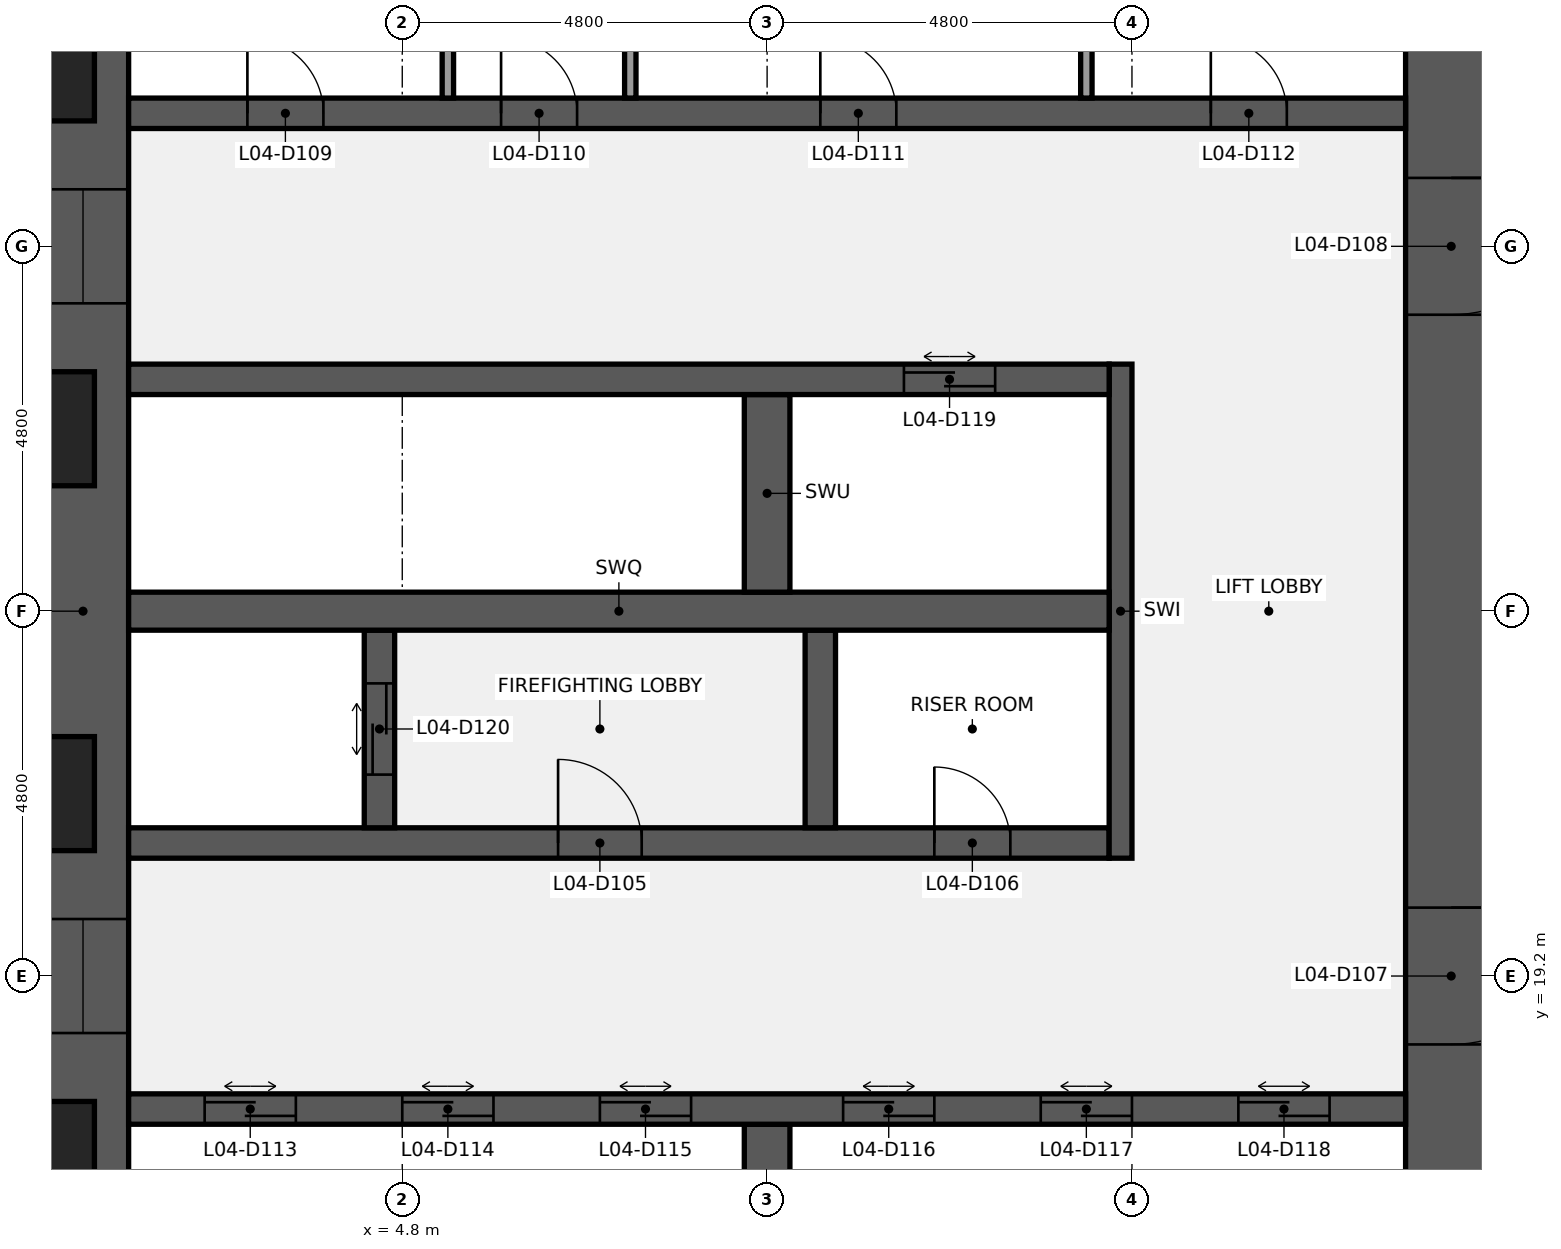
"""IFC4 building model, lengths in metres.
Left out: names, types, materials, properties, quantities, classifications, styles, units other than length and angle.
Written with IfcOpenShell. Run it as: python <this file> out.ifc"""

import sys

from ifc_helpers import new_model, si_unit, direction, frame, frame_2d, origin, place, context, subcontext, project, spatial, rectangle, extrude, element, fill, save


model = new_model("IFC4")
c1 = context("Model", 3, precision=1e-05, world=origin(), true_north=direction((0.0, 1.0)))
c2 = subcontext(c1, "Body", "Model", "MODEL_VIEW")
j1 = project(units=[si_unit("LENGTHUNIT", "METRE"), si_unit("PLANEANGLEUNIT", "RADIAN")], contexts=[c1])
p1 = place(None, origin())
s1 = spatial("IfcSite", under=j1, at=p1, CompositionType="ELEMENT")
p2 = place(p1, origin())
s2 = spatial("IfcBuilding", under=s1, at=p2, CompositionType="ELEMENT")
p3 = place(p2, frame((0.0, 0.0, 25.8)))
s3 = spatial("IfcBuildingStorey", under=s2, at=p3, CompositionType="ELEMENT", Elevation=25.8)
p4 = place(p3, frame((0.6, 9.6, 0.0), z_axis=(0.0, 0.0, 1.0), x_axis=(0.0, 1.0, 0.0)))
e1 = element("IfcWall", 1, at=p4, inside=s3, PredefinedType="SHEAR", context=c2, shape_type="SweptSolid", body=[
    extrude(rectangle(XDim=28.8, YDim=1.2, at=frame_2d((14.4, 0.0))), origin(), (0.0, 0.0, 1.0), 4.24),
])
p5 = place(p4, frame((8.85, 0.0, 0.9)))
e2 = element("IfcOpeningElement", 2, at=p5, cuts=e1, PredefinedType="OPENING", context=c2, shape_type="SweptSolid", body=[
    extrude(rectangle(XDim=1.5, YDim=1.5, at=frame_2d((0.75, 0.75))), frame((0.0, 0.61, 0.0), z_axis=(0.0, -1.0, 0.0), x_axis=(1.0, 0.0, 0.0)), (0.0, 0.0, 1.0), 1.22),
])
p6 = place(p4, frame((18.45, 0.0, 0.9)))
e3 = element("IfcOpeningElement", 3, at=p6, cuts=e1, PredefinedType="OPENING", context=c2, shape_type="SweptSolid", body=[
    extrude(rectangle(XDim=1.5, YDim=1.5, at=frame_2d((0.75, 0.75))), frame((0.0, 0.61, 0.0), z_axis=(0.0, -1.0, 0.0), x_axis=(1.0, 0.0, 0.0)), (0.0, 0.0, 1.0), 1.22),
])
p7 = place(p3, frame((18.6, 38.4, 0.0), z_axis=(0.0, 0.0, 1.0), x_axis=(0.0, -1.0, 0.0)))
e4 = element("IfcWall", 4, at=p7, inside=s3, PredefinedType="SHEAR", context=c2, shape_type="SweptSolid", body=[
    extrude(rectangle(XDim=28.8, YDim=1.2, at=frame_2d((14.4, 0.0))), origin(), (0.0, 0.0, 1.0), 4.24),
])
p8 = place(p7, frame((18.3, 0.0, 0.0)))
e5 = element("IfcOpeningElement", 5, at=p8, cuts=e4, PredefinedType="OPENING", context=c2, shape_type="SweptSolid", body=[
    extrude(rectangle(XDim=1.8, YDim=2.1, at=frame_2d((0.9, 1.05))), frame((0.0, 0.61, 0.0), z_axis=(0.0, -1.0, 0.0), x_axis=(1.0, 0.0, 0.0)), (0.0, 0.0, 1.0), 1.22),
])
p9 = place(p7, frame((8.7, 0.0, 0.0)))
e6 = element("IfcOpeningElement", 6, at=p9, cuts=e4, PredefinedType="OPENING", context=c2, shape_type="SweptSolid", body=[
    extrude(rectangle(XDim=1.8, YDim=2.1, at=frame_2d((0.9, 1.05))), frame((0.0, 0.61, 0.0), z_axis=(0.0, -1.0, 0.0), x_axis=(1.0, 0.0, 0.0)), (0.0, 0.0, 1.0), 1.22),
])
p10 = place(p3, frame((9.6, 14.65, 0.0), z_axis=(0.0, 0.0, 1.0), x_axis=(0.0, 1.0, 0.0)))
e7 = element("IfcWall", 7, at=p10, inside=s3, PredefinedType="SHEAR", context=c2, shape_type="SweptSolid", body=[
    extrude(rectangle(XDim=2.6, YDim=0.6, at=frame_2d((1.3, 0.0))), origin(), (0.0, 0.0, 1.0), 4.24),
])
p11 = place(p3, frame((1.2, 17.45, 0.0), z_axis=(0.0, 0.0, 1.0), x_axis=(1.0, 0.0, 0.0)))
e8 = element("IfcWall", 8, at=p11, inside=s3, PredefinedType="SHEAR", context=c2, shape_type="SweptSolid", body=[
    extrude(rectangle(XDim=16.8, YDim=0.4, at=frame_2d((8.4, 0.0))), origin(), (0.0, 0.0, 1.0), 4.24),
])
p12 = place(p11, frame((1.0, 0.0, 0.0)))
e9 = element("IfcOpeningElement", 9, at=p12, cuts=e8, PredefinedType="OPENING", context=c2, shape_type="SweptSolid", body=[
    extrude(rectangle(XDim=1.2, YDim=2.1, at=frame_2d((0.6, 1.05))), frame((0.0, 0.21, 0.0), z_axis=(0.0, -1.0, 0.0), x_axis=(1.0, 0.0, 0.0)), (0.0, 0.0, 1.0), 0.42),
])
p13 = place(p11, frame((3.6, 0.0, 0.0)))
e10 = element("IfcOpeningElement", 10, at=p13, cuts=e8, PredefinedType="OPENING", context=c2, shape_type="SweptSolid", body=[
    extrude(rectangle(XDim=1.2, YDim=2.1, at=frame_2d((0.6, 1.05))), frame((0.0, 0.21, 0.0), z_axis=(0.0, -1.0, 0.0), x_axis=(1.0, 0.0, 0.0)), (0.0, 0.0, 1.0), 0.42),
])
p14 = place(p11, frame((6.2, 0.0, 0.0)))
e11 = element("IfcOpeningElement", 11, at=p14, cuts=e8, PredefinedType="OPENING", context=c2, shape_type="SweptSolid", body=[
    extrude(rectangle(XDim=1.2, YDim=2.1, at=frame_2d((0.6, 1.05))), frame((0.0, 0.21, 0.0), z_axis=(0.0, -1.0, 0.0), x_axis=(1.0, 0.0, 0.0)), (0.0, 0.0, 1.0), 0.42),
])
p15 = place(p11, frame((9.4, 0.0, 0.0)))
e12 = element("IfcOpeningElement", 12, at=p15, cuts=e8, PredefinedType="OPENING", context=c2, shape_type="SweptSolid", body=[
    extrude(rectangle(XDim=1.2, YDim=2.1, at=frame_2d((0.6, 1.05))), frame((0.0, 0.21, 0.0), z_axis=(0.0, -1.0, 0.0), x_axis=(1.0, 0.0, 0.0)), (0.0, 0.0, 1.0), 0.42),
])
p16 = place(p11, frame((12.0, 0.0, 0.0)))
e13 = element("IfcOpeningElement", 13, at=p16, cuts=e8, PredefinedType="OPENING", context=c2, shape_type="SweptSolid", body=[
    extrude(rectangle(XDim=1.2, YDim=2.1, at=frame_2d((0.6, 1.05))), frame((0.0, 0.21, 0.0), z_axis=(0.0, -1.0, 0.0), x_axis=(1.0, 0.0, 0.0)), (0.0, 0.0, 1.0), 0.42),
])
p17 = place(p11, frame((14.6, 0.0, 0.0)))
e14 = element("IfcOpeningElement", 14, at=p17, cuts=e8, PredefinedType="OPENING", context=c2, shape_type="SweptSolid", body=[
    extrude(rectangle(XDim=1.2, YDim=2.1, at=frame_2d((0.6, 1.05))), frame((0.0, 0.21, 0.0), z_axis=(0.0, -1.0, 0.0), x_axis=(1.0, 0.0, 0.0)), (0.0, 0.0, 1.0), 0.42),
])
p18 = place(p3, frame((1.2, 20.95, 0.0), z_axis=(0.0, 0.0, 1.0), x_axis=(1.0, 0.0, 0.0)))
e15 = element("IfcWall", 15, at=p18, inside=s3, PredefinedType="SHEAR", context=c2, shape_type="SweptSolid", body=[
    extrude(rectangle(XDim=12.9, YDim=0.4, at=frame_2d((6.45, 0.0))), origin(), (0.0, 0.0, 1.0), 4.24),
])
p19 = place(p18, frame((5.65, 0.0, 0.0)))
e16 = element("IfcOpeningElement", 16, at=p19, cuts=e15, PredefinedType="OPENING", context=c2, shape_type="SweptSolid", body=[
    extrude(rectangle(XDim=1.1, YDim=2.1, at=frame_2d((0.55, 1.05))), frame((0.0, 0.21, 0.0), z_axis=(0.0, -1.0, 0.0), x_axis=(1.0, 0.0, 0.0)), (0.0, 0.0, 1.0), 0.42),
])
p20 = place(p18, frame((10.6, 0.0, 0.0)))
e17 = element("IfcOpeningElement", 17, at=p20, cuts=e15, PredefinedType="OPENING", context=c2, shape_type="SweptSolid", body=[
    extrude(rectangle(XDim=1.0, YDim=2.1, at=frame_2d((0.5, 1.05))), frame((0.0, 0.21, 0.0), z_axis=(0.0, -1.0, 0.0), x_axis=(1.0, 0.0, 0.0)), (0.0, 0.0, 1.0), 0.42),
])
p21 = place(p3, frame((14.25, 20.75, 0.0), z_axis=(0.0, 0.0, 1.0), x_axis=(0.0, 1.0, 0.0)))
e18 = element("IfcWall", 18, at=p21, inside=s3, PredefinedType="SHEAR", context=c2, shape_type="SweptSolid", body=[
    extrude(rectangle(XDim=6.5, YDim=0.3, at=frame_2d((3.25, 0.0))), origin(), (0.0, 0.0, 1.0), 4.24),
])
p22 = place(p3, frame((4.5, 21.15, 0.0), z_axis=(0.0, 0.0, 1.0), x_axis=(0.0, 1.0, 0.0)))
e19 = element("IfcWall", 19, at=p22, inside=s3, PredefinedType="SHEAR", context=c2, shape_type="SweptSolid", body=[
    extrude(rectangle(XDim=2.6, YDim=0.4, at=frame_2d((1.3, 0.0))), origin(), (0.0, 0.0, 1.0), 4.24),
])
p23 = place(p22, frame((0.7, 0.0, 0.0)))
e20 = element("IfcOpeningElement", 20, at=p23, cuts=e19, PredefinedType="OPENING", context=c2, shape_type="SweptSolid", body=[
    extrude(rectangle(XDim=1.2, YDim=2.1, at=frame_2d((0.6, 1.05))), frame((0.0, 0.21, 0.0), z_axis=(0.0, -1.0, 0.0), x_axis=(1.0, 0.0, 0.0)), (0.0, 0.0, 1.0), 0.42),
])
p24 = place(p3, frame((10.3, 21.15, 0.0), z_axis=(0.0, 0.0, 1.0), x_axis=(0.0, 1.0, 0.0)))
e21 = element("IfcWall", 21, at=p24, inside=s3, PredefinedType="SHEAR", context=c2, shape_type="SweptSolid", body=[
    extrude(rectangle(XDim=2.6, YDim=0.4, at=frame_2d((1.3, 0.0))), origin(), (0.0, 0.0, 1.0), 4.24),
])
p25 = place(p3, frame((1.2, 24.0, 0.0), z_axis=(0.0, 0.0, 1.0), x_axis=(1.0, 0.0, 0.0)))
e22 = element("IfcWall", 22, at=p25, inside=s3, PredefinedType="SHEAR", context=c2, shape_type="SweptSolid", body=[
    extrude(rectangle(XDim=12.9, YDim=0.5, at=frame_2d((6.45, 0.0))), origin(), (0.0, 0.0, 1.0), 4.24),
])
p26 = place(p3, frame((9.6, 24.25, 0.0), z_axis=(0.0, 0.0, 1.0), x_axis=(0.0, 1.0, 0.0)))
e23 = element("IfcWall", 23, at=p26, inside=s3, PredefinedType="SHEAR", context=c2, shape_type="SweptSolid", body=[
    extrude(rectangle(XDim=2.6, YDim=0.6, at=frame_2d((1.3, 0.0))), origin(), (0.0, 0.0, 1.0), 4.24),
])
p27 = place(p3, frame((1.2, 27.05, 0.0), z_axis=(0.0, 0.0, 1.0), x_axis=(1.0, 0.0, 0.0)))
e24 = element("IfcWall", 24, at=p27, inside=s3, PredefinedType="SHEAR", context=c2, shape_type="SweptSolid", body=[
    extrude(rectangle(XDim=12.9, YDim=0.4, at=frame_2d((6.45, 0.0))), origin(), (0.0, 0.0, 1.0), 4.24),
])
p28 = place(p27, frame((10.2, 0.0, 0.0)))
e25 = element("IfcOpeningElement", 25, at=p28, cuts=e24, PredefinedType="OPENING", context=c2, shape_type="SweptSolid", body=[
    extrude(rectangle(XDim=1.2, YDim=2.1, at=frame_2d((0.6, 1.05))), frame((0.0, 0.21, 0.0), z_axis=(0.0, -1.0, 0.0), x_axis=(1.0, 0.0, 0.0)), (0.0, 0.0, 1.0), 0.42),
])
p29 = place(p3, frame((1.2, 30.55, 0.0), z_axis=(0.0, 0.0, 1.0), x_axis=(1.0, 0.0, 0.0)))
e26 = element("IfcWall", 26, at=p29, inside=s3, PredefinedType="SHEAR", context=c2, shape_type="SweptSolid", body=[
    extrude(rectangle(XDim=16.8, YDim=0.4, at=frame_2d((8.4, 0.0))), origin(), (0.0, 0.0, 1.0), 4.24),
])
p30 = place(p29, frame((1.562, 0.0, 0.0)))
e27 = element("IfcOpeningElement", 27, at=p30, cuts=e26, PredefinedType="OPENING", context=c2, shape_type="SweptSolid", body=[
    extrude(rectangle(XDim=1.0, YDim=2.1, at=frame_2d((0.5, 1.05))), frame((0.0, 0.21, 0.0), z_axis=(0.0, -1.0, 0.0), x_axis=(1.0, 0.0, 0.0)), (0.0, 0.0, 1.0), 0.42),
])
p31 = place(p29, frame((4.9, 0.0, 0.0)))
e28 = element("IfcOpeningElement", 28, at=p31, cuts=e26, PredefinedType="OPENING", context=c2, shape_type="SweptSolid", body=[
    extrude(rectangle(XDim=1.0, YDim=2.1, at=frame_2d((0.5, 1.05))), frame((0.0, 0.21, 0.0), z_axis=(0.0, -1.0, 0.0), x_axis=(1.0, 0.0, 0.0)), (0.0, 0.0, 1.0), 0.42),
])
p32 = place(p29, frame((9.1, 0.0, 0.0)))
e29 = element("IfcOpeningElement", 29, at=p32, cuts=e26, PredefinedType="OPENING", context=c2, shape_type="SweptSolid", body=[
    extrude(rectangle(XDim=1.0, YDim=2.1, at=frame_2d((0.5, 1.05))), frame((0.0, 0.21, 0.0), z_axis=(0.0, -1.0, 0.0), x_axis=(1.0, 0.0, 0.0)), (0.0, 0.0, 1.0), 0.42),
])
p33 = place(p29, frame((14.238, 0.0, 0.0)))
e30 = element("IfcOpeningElement", 30, at=p33, cuts=e26, PredefinedType="OPENING", context=c2, shape_type="SweptSolid", body=[
    extrude(rectangle(XDim=1.0, YDim=2.1, at=frame_2d((0.5, 1.05))), frame((0.0, 0.21, 0.0), z_axis=(0.0, -1.0, 0.0), x_axis=(1.0, 0.0, 0.0)), (0.0, 0.0, 1.0), 0.42),
])
for number, where, z_axis, x_axis in (
    (31, (5.4, 30.75, 0.0), (0.0, 0.0, 1.0), (0.0, 1.0, 0.0)),
    (32, (7.8, 30.75, 0.0), (0.0, 0.0, 1.0), (0.0, 1.0, 0.0)),
    (33, (13.8, 30.75, 0.0), (0.0, 0.0, 1.0), (0.0, 1.0, 0.0)),
):
    element("IfcWall", number, at=place(p3, frame(where, z_axis=z_axis, x_axis=x_axis)), inside=s3, PredefinedType="PARTITIONING", context=c2, shape_type="SweptSolid", body=[
        extrude(rectangle(XDim=2.6, YDim=0.15, at=frame_2d((1.3, 0.0))), origin(), (0.0, 0.0, 1.0), 4.24),
    ])
p34 = place(p19, origin())
e34 = element("IfcDoor", 34, at=p34, inside=s3, OperationType="SINGLE_SWING_LEFT", PredefinedType="DOOR", context=c2, shape_type="SweptSolid", body=[
    extrude(rectangle(XDim=1.1, YDim=2.1, at=frame_2d((0.55, 1.05))), frame((0.0, 0.025, 0.0), z_axis=(0.0, -1.0, 0.0), x_axis=(1.0, 0.0, 0.0)), (0.0, 0.0, 1.0), 0.05),
])
fill(e16, e34)
p35 = place(p20, origin())
e35 = element("IfcDoor", 35, at=p35, inside=s3, OperationType="SINGLE_SWING_LEFT", PredefinedType="DOOR", context=c2, shape_type="SweptSolid", body=[
    extrude(rectangle(XDim=1.0, YDim=2.1, at=frame_2d((0.5, 1.05))), frame((0.0, 0.025, 0.0), z_axis=(0.0, -1.0, 0.0), x_axis=(1.0, 0.0, 0.0)), (0.0, 0.0, 1.0), 0.05),
])
fill(e17, e35)
p36 = place(p8, origin())
e36 = element("IfcDoor", 36, at=p36, inside=s3, OperationType="DOUBLE_DOOR_SINGLE_SWING", PredefinedType="DOOR", context=c2, shape_type="SweptSolid", body=[
    extrude(rectangle(XDim=1.8, YDim=2.1, at=frame_2d((0.9, 1.05))), frame((0.0, 0.025, 0.0), z_axis=(0.0, -1.0, 0.0), x_axis=(1.0, 0.0, 0.0)), (0.0, 0.0, 1.0), 0.05),
])
fill(e5, e36)
p37 = place(p9, origin())
e37 = element("IfcDoor", 37, at=p37, inside=s3, OperationType="DOUBLE_DOOR_SINGLE_SWING", PredefinedType="DOOR", context=c2, shape_type="SweptSolid", body=[
    extrude(rectangle(XDim=1.8, YDim=2.1, at=frame_2d((0.9, 1.05))), frame((0.0, 0.025, 0.0), z_axis=(0.0, -1.0, 0.0), x_axis=(1.0, 0.0, 0.0)), (0.0, 0.0, 1.0), 0.05),
])
fill(e6, e37)
p38 = place(p30, origin())
e38 = element("IfcDoor", 38, at=p38, inside=s3, OperationType="SINGLE_SWING_LEFT", PredefinedType="DOOR", context=c2, shape_type="SweptSolid", body=[
    extrude(rectangle(XDim=1.0, YDim=2.1, at=frame_2d((0.5, 1.05))), frame((0.0, 0.025, 0.0), z_axis=(0.0, -1.0, 0.0), x_axis=(1.0, 0.0, 0.0)), (0.0, 0.0, 1.0), 0.05),
])
fill(e27, e38)
p39 = place(p31, origin())
e39 = element("IfcDoor", 39, at=p39, inside=s3, OperationType="SINGLE_SWING_LEFT", PredefinedType="DOOR", context=c2, shape_type="SweptSolid", body=[
    extrude(rectangle(XDim=1.0, YDim=2.1, at=frame_2d((0.5, 1.05))), frame((0.0, 0.025, 0.0), z_axis=(0.0, -1.0, 0.0), x_axis=(1.0, 0.0, 0.0)), (0.0, 0.0, 1.0), 0.05),
])
fill(e28, e39)
p40 = place(p32, origin())
e40 = element("IfcDoor", 40, at=p40, inside=s3, OperationType="SINGLE_SWING_LEFT", PredefinedType="DOOR", context=c2, shape_type="SweptSolid", body=[
    extrude(rectangle(XDim=1.0, YDim=2.1, at=frame_2d((0.5, 1.05))), frame((0.0, 0.025, 0.0), z_axis=(0.0, -1.0, 0.0), x_axis=(1.0, 0.0, 0.0)), (0.0, 0.0, 1.0), 0.05),
])
fill(e29, e40)
p41 = place(p33, origin())
e41 = element("IfcDoor", 41, at=p41, inside=s3, OperationType="SINGLE_SWING_LEFT", PredefinedType="DOOR", context=c2, shape_type="SweptSolid", body=[
    extrude(rectangle(XDim=1.0, YDim=2.1, at=frame_2d((0.5, 1.05))), frame((0.0, 0.025, 0.0), z_axis=(0.0, -1.0, 0.0), x_axis=(1.0, 0.0, 0.0)), (0.0, 0.0, 1.0), 0.05),
])
fill(e30, e41)
p42 = place(p12, origin())
e42 = element("IfcDoor", 42, at=p42, inside=s3, OperationType="DOUBLE_DOOR_SLIDING", PredefinedType="DOOR", context=c2, shape_type="SweptSolid", body=[
    extrude(rectangle(XDim=1.2, YDim=2.1, at=frame_2d((0.6, 1.05))), frame((0.0, 0.025, 0.0), z_axis=(0.0, -1.0, 0.0), x_axis=(1.0, 0.0, 0.0)), (0.0, 0.0, 1.0), 0.05),
])
fill(e9, e42)
p43 = place(p13, origin())
e43 = element("IfcDoor", 43, at=p43, inside=s3, OperationType="DOUBLE_DOOR_SLIDING", PredefinedType="DOOR", context=c2, shape_type="SweptSolid", body=[
    extrude(rectangle(XDim=1.2, YDim=2.1, at=frame_2d((0.6, 1.05))), frame((0.0, 0.025, 0.0), z_axis=(0.0, -1.0, 0.0), x_axis=(1.0, 0.0, 0.0)), (0.0, 0.0, 1.0), 0.05),
])
fill(e10, e43)
p44 = place(p14, origin())
e44 = element("IfcDoor", 44, at=p44, inside=s3, OperationType="DOUBLE_DOOR_SLIDING", PredefinedType="DOOR", context=c2, shape_type="SweptSolid", body=[
    extrude(rectangle(XDim=1.2, YDim=2.1, at=frame_2d((0.6, 1.05))), frame((0.0, 0.025, 0.0), z_axis=(0.0, -1.0, 0.0), x_axis=(1.0, 0.0, 0.0)), (0.0, 0.0, 1.0), 0.05),
])
fill(e11, e44)
p45 = place(p15, origin())
e45 = element("IfcDoor", 45, at=p45, inside=s3, OperationType="DOUBLE_DOOR_SLIDING", PredefinedType="DOOR", context=c2, shape_type="SweptSolid", body=[
    extrude(rectangle(XDim=1.2, YDim=2.1, at=frame_2d((0.6, 1.05))), frame((0.0, 0.025, 0.0), z_axis=(0.0, -1.0, 0.0), x_axis=(1.0, 0.0, 0.0)), (0.0, 0.0, 1.0), 0.05),
])
fill(e12, e45)
p46 = place(p16, origin())
e46 = element("IfcDoor", 46, at=p46, inside=s3, OperationType="DOUBLE_DOOR_SLIDING", PredefinedType="DOOR", context=c2, shape_type="SweptSolid", body=[
    extrude(rectangle(XDim=1.2, YDim=2.1, at=frame_2d((0.6, 1.05))), frame((0.0, 0.025, 0.0), z_axis=(0.0, -1.0, 0.0), x_axis=(1.0, 0.0, 0.0)), (0.0, 0.0, 1.0), 0.05),
])
fill(e13, e46)
p47 = place(p17, origin())
e47 = element("IfcDoor", 47, at=p47, inside=s3, OperationType="DOUBLE_DOOR_SLIDING", PredefinedType="DOOR", context=c2, shape_type="SweptSolid", body=[
    extrude(rectangle(XDim=1.2, YDim=2.1, at=frame_2d((0.6, 1.05))), frame((0.0, 0.025, 0.0), z_axis=(0.0, -1.0, 0.0), x_axis=(1.0, 0.0, 0.0)), (0.0, 0.0, 1.0), 0.05),
])
fill(e14, e47)
p48 = place(p28, origin())
e48 = element("IfcDoor", 48, at=p48, inside=s3, OperationType="DOUBLE_DOOR_SLIDING", PredefinedType="DOOR", context=c2, shape_type="SweptSolid", body=[
    extrude(rectangle(XDim=1.2, YDim=2.1, at=frame_2d((0.6, 1.05))), frame((0.0, 0.025, 0.0), z_axis=(0.0, -1.0, 0.0), x_axis=(1.0, 0.0, 0.0)), (0.0, 0.0, 1.0), 0.05),
])
fill(e25, e48)
p49 = place(p23, origin())
e49 = element("IfcDoor", 49, at=p49, inside=s3, OperationType="DOUBLE_DOOR_SLIDING", PredefinedType="DOOR", context=c2, shape_type="SweptSolid", body=[
    extrude(rectangle(XDim=1.2, YDim=2.1, at=frame_2d((0.6, 1.05))), frame((0.0, 0.025, 0.0), z_axis=(0.0, -1.0, 0.0), x_axis=(1.0, 0.0, 0.0)), (0.0, 0.0, 1.0), 0.05),
])
fill(e20, e49)
p50 = place(p5, origin())
e50 = element("IfcWindow", 50, at=p50, inside=s3, PartitioningType="SINGLE_PANEL", PredefinedType="WINDOW", context=c2, shape_type="SweptSolid", body=[
    extrude(rectangle(XDim=1.5, YDim=1.5, at=frame_2d((0.75, 0.75))), frame((0.0, 0.03, 0.0), z_axis=(0.0, -1.0, 0.0), x_axis=(1.0, 0.0, 0.0)), (0.0, 0.0, 1.0), 0.06),
])
fill(e2, e50)
p51 = place(p6, origin())
e51 = element("IfcWindow", 51, at=p51, inside=s3, PartitioningType="SINGLE_PANEL", PredefinedType="WINDOW", context=c2, shape_type="SweptSolid", body=[
    extrude(rectangle(XDim=1.5, YDim=1.5, at=frame_2d((0.75, 0.75))), frame((0.0, 0.03, 0.0), z_axis=(0.0, -1.0, 0.0), x_axis=(1.0, 0.0, 0.0)), (0.0, 0.0, 1.0), 0.06),
])
fill(e3, e51)
save(model, sys.argv[1])
